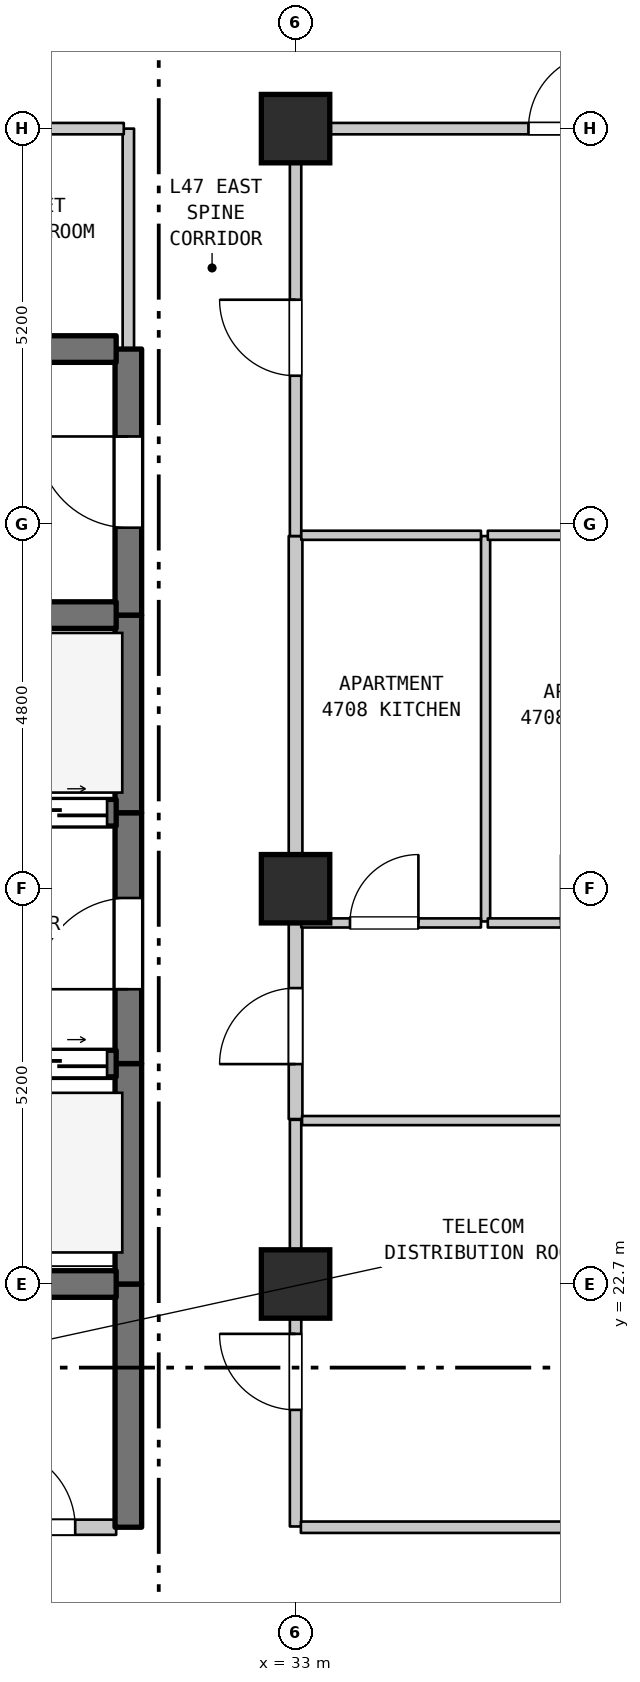
"""IFC4 building model, lengths in metres.
Left out: names, types, materials, properties, quantities, classifications, styles, units other than length and angle.
Written with IfcOpenShell. Run it as: python <this file> out.ifc"""

import sys

from ifc_helpers import new_model, si_unit, direction, frame, frame_2d, origin, origin_2d, place, context, subcontext, project, spatial, rectangle, extrude, element, fill, save


model = new_model("IFC4")
c1 = context("Model", 3, precision=1e-05, world=origin(), true_north=direction((0.0, 1.0)))
c2 = subcontext(c1, "Body", "Model", "MODEL_VIEW")
j1 = project(units=[si_unit("LENGTHUNIT", "METRE"), si_unit("PLANEANGLEUNIT", "RADIAN")], contexts=[c1])
p1 = place(None, origin())
s1 = spatial("IfcSite", under=j1, at=p1, CompositionType="ELEMENT")
p2 = place(p1, origin())
s2 = spatial("IfcBuilding", under=s1, at=p2, CompositionType="ELEMENT")
p3 = place(p2, frame((0.0, 0.0, 192.1)))
s3 = spatial("IfcBuildingStorey", under=s2, at=p3, CompositionType="ELEMENT", Elevation=192.1)
for number, where, z_axis, x_axis in (
    (1, (33.0, 22.7, 0.0), (0.0, 0.0, 1.0), (1.0, 0.0, 0.0)),
    (2, (33.0, 27.9, 0.0), (0.0, 0.0, 1.0), (1.0, 0.0, 0.0)),
    (3, (33.0, 37.9, 0.0), (0.0, 0.0, 1.0), (1.0, 0.0, 0.0)),
):
    element("IfcColumn", number, at=place(p3, frame(where, z_axis=z_axis, x_axis=x_axis)), inside=s3, PredefinedType="COLUMN", context=c2, shape_type="SweptSolid", body=[
        extrude(rectangle(XDim=0.9, YDim=0.9, at=origin_2d()), origin(), (0.0, 0.0, 1.0), 3.7),
    ])
p4 = place(p3, frame((30.8, 19.5, 0.0), z_axis=(0.0, 0.0, 1.0), x_axis=(0.0, 1.0, 0.0)))
e4 = element("IfcWall", 4, at=p4, inside=s3, PredefinedType="SHEAR", context=c2, shape_type="SweptSolid", body=[
    extrude(rectangle(XDim=3.2, YDim=0.35, at=frame_2d((1.6, 0.0))), origin(), (0.0, 0.0, 1.0), 3.39),
])
p5 = place(p3, frame((30.8, 22.7, 0.0), z_axis=(0.0, 0.0, 1.0), x_axis=(0.0, 1.0, 0.0)))
e5 = element("IfcWall", 5, at=p5, inside=s3, PredefinedType="SHEAR", context=c2, shape_type="SweptSolid", body=[
    extrude(rectangle(XDim=2.9, YDim=0.35, at=frame_2d((1.45, 0.0))), origin(), (0.0, 0.0, 1.0), 3.39),
])
p6 = place(p3, frame((30.8, 25.6, 0.0), z_axis=(0.0, 0.0, 1.0), x_axis=(0.0, 1.0, 0.0)))
e6 = element("IfcWall", 6, at=p6, inside=s3, PredefinedType="SHEAR", context=c2, shape_type="SweptSolid", body=[
    extrude(rectangle(XDim=3.3, YDim=0.35, at=frame_2d((1.65, 0.0))), origin(), (0.0, 0.0, 1.0), 3.39),
])
p7 = place(p6, frame((0.978, 0.0, 0.0)))
e7 = element("IfcOpeningElement", 7, at=p7, cuts=e6, PredefinedType="OPENING", context=c2, shape_type="SweptSolid", body=[
    extrude(rectangle(XDim=1.2, YDim=2.2, at=frame_2d((0.6, 1.1))), frame((0.0, 0.185, 0.0), z_axis=(0.0, -1.0, 0.0), x_axis=(1.0, 0.0, 0.0)), (0.0, 0.0, 1.0), 0.37),
])
p8 = place(p3, frame((30.8, 28.9, 0.0), z_axis=(0.0, 0.0, 1.0), x_axis=(0.0, 1.0, 0.0)))
e8 = element("IfcWall", 8, at=p8, inside=s3, PredefinedType="SHEAR", context=c2, shape_type="SweptSolid", body=[
    extrude(rectangle(XDim=2.6, YDim=0.35, at=frame_2d((1.3, 0.0))), origin(), (0.0, 0.0, 1.0), 3.39),
])
p9 = place(p3, frame((30.8, 31.5, 0.0), z_axis=(0.0, 0.0, 1.0), x_axis=(0.0, 1.0, 0.0)))
e9 = element("IfcWall", 9, at=p9, inside=s3, PredefinedType="SHEAR", context=c2, shape_type="SweptSolid", body=[
    extrude(rectangle(XDim=3.5, YDim=0.35, at=frame_2d((1.75, 0.0))), origin(), (0.0, 0.0, 1.0), 3.39),
])
p10 = place(p9, frame((1.15, 0.0, 0.0)))
e10 = element("IfcOpeningElement", 10, at=p10, cuts=e9, PredefinedType="OPENING", context=c2, shape_type="SweptSolid", body=[
    extrude(rectangle(XDim=1.2, YDim=2.2, at=frame_2d((0.6, 1.1))), frame((0.0, 0.185, 0.0), z_axis=(0.0, -1.0, 0.0), x_axis=(1.0, 0.0, 0.0)), (0.0, 0.0, 1.0), 0.37),
])
p11 = place(p3, frame((30.8, 35.0, 0.0), z_axis=(0.0, 0.0, 1.0), x_axis=(0.0, 1.0, 0.0)))
e11 = element("IfcWall", 11, at=p11, inside=s3, PredefinedType="STANDARD", context=c2, shape_type="SweptSolid", body=[
    extrude(rectangle(XDim=2.9, YDim=0.15, at=frame_2d((1.45, 0.0))), origin(), (0.0, 0.0, 1.0), 3.39),
])
p12 = place(p3, frame((33.0, 19.51, 0.0), z_axis=(0.0, 0.0, 1.0), x_axis=(0.0, 1.0, 0.0)))
e12 = element("IfcWall", 12, at=p12, inside=s3, PredefinedType="STANDARD", context=c2, shape_type="SweptSolid", body=[
    extrude(rectangle(XDim=5.35, YDim=0.15, at=frame_2d((2.675, 0.0))), origin(), (0.0, 0.0, 1.0), 2.99),
])
p13 = place(p12, frame((1.534, 0.0, 0.0)))
e13 = element("IfcOpeningElement", 13, at=p13, cuts=e12, PredefinedType="OPENING", context=c2, shape_type="SweptSolid", body=[
    extrude(rectangle(XDim=1.0, YDim=2.15, at=frame_2d((0.5, 1.075))), frame((0.0, 0.085, 0.0), z_axis=(0.0, -1.0, 0.0), x_axis=(1.0, 0.0, 0.0)), (0.0, 0.0, 1.0), 0.17),
])
p14 = place(p3, frame((33.0, 24.87, 0.0), z_axis=(0.0, 0.0, 1.0), x_axis=(0.0, 1.0, 0.0)))
e14 = element("IfcWall", 14, at=p14, inside=s3, PredefinedType="STANDARD", context=c2, shape_type="SweptSolid", body=[
    extrude(rectangle(XDim=2.6, YDim=0.18, at=frame_2d((1.3, 0.0))), origin(), (0.0, 0.0, 1.0), 2.99),
])
p15 = place(p14, frame((0.723, 0.0, 0.0)))
e15 = element("IfcOpeningElement", 15, at=p15, cuts=e14, PredefinedType="OPENING", context=c2, shape_type="SweptSolid", body=[
    extrude(rectangle(XDim=1.0, YDim=2.15, at=frame_2d((0.5, 1.075))), frame((0.0, 0.1, 0.0), z_axis=(0.0, -1.0, 0.0), x_axis=(1.0, 0.0, 0.0)), (0.0, 0.0, 1.0), 0.2),
])
p16 = place(p3, frame((33.0, 27.47, 0.0), z_axis=(0.0, 0.0, 1.0), x_axis=(0.0, 1.0, 0.0)))
e16 = element("IfcWall", 16, at=p16, inside=s3, PredefinedType="STANDARD", context=c2, shape_type="SweptSolid", body=[
    extrude(rectangle(XDim=5.07, YDim=0.18, at=frame_2d((2.535, 0.0))), origin(), (0.0, 0.0, 1.0), 2.89),
])
p17 = place(p3, frame((33.0, 32.54, 0.0), z_axis=(0.0, 0.0, 1.0), x_axis=(0.0, 1.0, 0.0)))
e17 = element("IfcWall", 17, at=p17, inside=s3, PredefinedType="STANDARD", context=c2, shape_type="SweptSolid", body=[
    extrude(rectangle(XDim=5.36, YDim=0.15, at=frame_2d((2.68, 0.0))), origin(), (0.0, 0.0, 1.0), 2.89),
])
p18 = place(p17, frame((2.109, 0.0, 0.0)))
e18 = element("IfcOpeningElement", 18, at=p18, cuts=e17, PredefinedType="OPENING", context=c2, shape_type="SweptSolid", body=[
    extrude(rectangle(XDim=1.0, YDim=2.15, at=frame_2d((0.5, 1.075))), frame((0.0, 0.085, 0.0), z_axis=(0.0, -1.0, 0.0), x_axis=(1.0, 0.0, 0.0)), (0.0, 0.0, 1.0), 0.17),
])
p19 = place(p3, frame((35.5, 27.47, 0.0), z_axis=(0.0, 0.0, 1.0), x_axis=(0.0, 1.0, 0.0)))
e19 = element("IfcWall", 19, at=p19, inside=s3, PredefinedType="PARTITIONING", context=c2, shape_type="SweptSolid", body=[
    extrude(rectangle(XDim=5.07, YDim=0.12, at=frame_2d((2.535, 0.0))), origin(), (0.0, 0.0, 1.0), 3.39),
])
p20 = place(p3, frame((28.585, 19.5, 0.0), z_axis=(0.0, 0.0, 1.0), x_axis=(1.0, 0.0, 0.0)))
e20 = element("IfcWall", 20, at=p20, inside=s3, PredefinedType="STANDARD", context=c2, shape_type="SweptSolid", body=[
    extrude(rectangle(XDim=2.055, YDim=0.2, at=frame_2d((1.027, 0.0))), origin(), (0.0, 0.0, 1.0), 3.39),
])
p21 = place(p20, frame((0.466, 0.0, 0.0)))
e21 = element("IfcOpeningElement", 21, at=p21, cuts=e20, PredefinedType="OPENING", context=c2, shape_type="SweptSolid", body=[
    extrude(rectangle(XDim=1.05, YDim=2.15, at=frame_2d((0.525, 1.075))), frame((0.0, 0.11, 0.0), z_axis=(0.0, -1.0, 0.0), x_axis=(1.0, 0.0, 0.0)), (0.0, 0.0, 1.0), 0.22),
])
p22 = place(p3, frame((33.07, 19.5, 0.0), z_axis=(0.0, 0.0, 1.0), x_axis=(1.0, 0.0, 0.0)))
e22 = element("IfcWall", 22, at=p22, inside=s3, PredefinedType="STANDARD", context=c2, shape_type="SweptSolid", body=[
    extrude(rectangle(XDim=21.51, YDim=0.15, at=frame_2d((10.755, 0.0))), origin(), (0.0, 0.0, 1.0), 3.39),
])
p23 = place(p22, frame((10.185, 0.0, 0.0)))
e23 = element("IfcOpeningElement", 23, at=p23, cuts=e22, PredefinedType="OPENING", context=c2, shape_type="SweptSolid", body=[
    extrude(rectangle(XDim=1.0, YDim=2.15, at=frame_2d((0.5, 1.075))), frame((0.0, 0.085, 0.0), z_axis=(0.0, -1.0, 0.0), x_axis=(1.0, 0.0, 0.0)), (0.0, 0.0, 1.0), 0.17),
])
p24 = place(p3, frame((28.585, 22.7, 0.0), z_axis=(0.0, 0.0, 1.0), x_axis=(1.0, 0.0, 0.0)))
e24 = element("IfcWall", 24, at=p24, inside=s3, PredefinedType="SHEAR", context=c2, shape_type="SweptSolid", body=[
    extrude(rectangle(XDim=2.055, YDim=0.35, at=frame_2d((1.027, 0.0))), origin(), (0.0, 0.0, 1.0), 3.39),
])
p25 = place(p3, frame((33.085, 24.85, 0.0), z_axis=(0.0, 0.0, 1.0), x_axis=(1.0, 0.0, 0.0)))
e25 = element("IfcWall", 25, at=p25, inside=s3, PredefinedType="PARTITIONING", context=c2, shape_type="SweptSolid", body=[
    extrude(rectangle(XDim=23.905, YDim=0.12, at=frame_2d((11.953, 0.0))), origin(), (0.0, 0.0, 1.0), 3.39),
])
p26 = place(p3, frame((27.46, 25.6, 0.0), z_axis=(0.0, 0.0, 1.0), x_axis=(1.0, 0.0, 0.0)))
e26 = element("IfcWall", 26, at=p26, inside=s3, PredefinedType="SHEAR", context=c2, shape_type="SweptSolid", body=[
    extrude(rectangle(XDim=3.18, YDim=0.35, at=frame_2d((1.59, 0.0))), origin(), (0.0, 0.0, 1.0), 3.39),
])
p27 = place(p26, frame((0.12, 0.0, 0.0)))
e27 = element("IfcOpeningElement", 27, at=p27, cuts=e26, PredefinedType="OPENING", context=c2, shape_type="SweptSolid", body=[
    extrude(rectangle(XDim=1.25, YDim=2.2, at=frame_2d((0.625, 1.1))), frame((0.0, 0.185, 0.0), z_axis=(0.0, -1.0, 0.0), x_axis=(1.0, 0.0, 0.0)), (0.0, 0.0, 1.0), 0.37),
])
p28 = place(p26, frame((1.81, 0.0, 0.0)))
e28 = element("IfcOpeningElement", 28, at=p28, cuts=e26, PredefinedType="OPENING", context=c2, shape_type="SweptSolid", body=[
    extrude(rectangle(XDim=1.25, YDim=2.2, at=frame_2d((0.625, 1.1))), frame((0.0, 0.185, 0.0), z_axis=(0.0, -1.0, 0.0), x_axis=(1.0, 0.0, 0.0)), (0.0, 0.0, 1.0), 0.37),
])
p29 = place(p3, frame((33.075, 27.45, 0.0), z_axis=(0.0, 0.0, 1.0), x_axis=(1.0, 0.0, 0.0)))
e29 = element("IfcWall", 29, at=p29, inside=s3, PredefinedType="PARTITIONING", context=c2, shape_type="SweptSolid", body=[
    extrude(rectangle(XDim=2.364, YDim=0.12, at=frame_2d((1.182, 0.0))), origin(), (0.0, 0.0, 1.0), 3.39),
])
p30 = place(p29, frame((0.641, 0.0, 0.0)))
e30 = element("IfcOpeningElement", 30, at=p30, cuts=e29, PredefinedType="OPENING", context=c2, shape_type="SweptSolid", body=[
    extrude(rectangle(XDim=0.9, YDim=2.15, at=frame_2d((0.45, 1.075))), frame((0.0, 0.07, 0.0), z_axis=(0.0, -1.0, 0.0), x_axis=(1.0, 0.0, 0.0)), (0.0, 0.0, 1.0), 0.14),
])
p31 = place(p3, frame((35.529, 27.45, 0.0), z_axis=(0.0, 0.0, 1.0), x_axis=(1.0, 0.0, 0.0)))
e31 = element("IfcWall", 31, at=p31, inside=s3, PredefinedType="PARTITIONING", context=c2, shape_type="SweptSolid", body=[
    extrude(rectangle(XDim=2.826, YDim=0.12, at=frame_2d((1.413, 0.0))), origin(), (0.0, 0.0, 1.0), 3.39),
])
p32 = place(p31, frame((0.963, 0.0, 0.0)))
e32 = element("IfcOpeningElement", 32, at=p32, cuts=e31, PredefinedType="OPENING", context=c2, shape_type="SweptSolid", body=[
    extrude(rectangle(XDim=0.9, YDim=2.1, at=frame_2d((0.45, 1.05))), frame((0.0, 0.07, 0.0), z_axis=(0.0, -1.0, 0.0), x_axis=(1.0, 0.0, 0.0)), (0.0, 0.0, 1.0), 0.14),
])
p33 = place(p3, frame((27.46, 28.9, 0.0), z_axis=(0.0, 0.0, 1.0), x_axis=(1.0, 0.0, 0.0)))
e33 = element("IfcWall", 33, at=p33, inside=s3, PredefinedType="SHEAR", context=c2, shape_type="SweptSolid", body=[
    extrude(rectangle(XDim=3.18, YDim=0.35, at=frame_2d((1.59, 0.0))), origin(), (0.0, 0.0, 1.0), 3.39),
])
p34 = place(p33, frame((0.12, 0.0, 0.0)))
e34 = element("IfcOpeningElement", 34, at=p34, cuts=e33, PredefinedType="OPENING", context=c2, shape_type="SweptSolid", body=[
    extrude(rectangle(XDim=1.25, YDim=2.2, at=frame_2d((0.625, 1.1))), frame((0.0, 0.185, 0.0), z_axis=(0.0, -1.0, 0.0), x_axis=(1.0, 0.0, 0.0)), (0.0, 0.0, 1.0), 0.37),
])
p35 = place(p33, frame((1.81, 0.0, 0.0)))
e35 = element("IfcOpeningElement", 35, at=p35, cuts=e33, PredefinedType="OPENING", context=c2, shape_type="SweptSolid", body=[
    extrude(rectangle(XDim=1.25, YDim=2.2, at=frame_2d((0.625, 1.1))), frame((0.0, 0.185, 0.0), z_axis=(0.0, -1.0, 0.0), x_axis=(1.0, 0.0, 0.0)), (0.0, 0.0, 1.0), 0.37),
])
p36 = place(p3, frame((27.46, 31.5, 0.0), z_axis=(0.0, 0.0, 1.0), x_axis=(1.0, 0.0, 0.0)))
e36 = element("IfcWall", 36, at=p36, inside=s3, PredefinedType="SHEAR", context=c2, shape_type="SweptSolid", body=[
    extrude(rectangle(XDim=3.18, YDim=0.35, at=frame_2d((1.59, 0.0))), origin(), (0.0, 0.0, 1.0), 3.39),
])
p37 = place(p3, frame((33.075, 32.55, 0.0), z_axis=(0.0, 0.0, 1.0), x_axis=(1.0, 0.0, 0.0)))
e37 = element("IfcWall", 37, at=p37, inside=s3, PredefinedType="PARTITIONING", context=c2, shape_type="SweptSolid", body=[
    extrude(rectangle(XDim=2.364, YDim=0.12, at=frame_2d((1.182, 0.0))), origin(), (0.0, 0.0, 1.0), 3.39),
])
p38 = place(p3, frame((35.529, 32.55, 0.0), z_axis=(0.0, 0.0, 1.0), x_axis=(1.0, 0.0, 0.0)))
e38 = element("IfcWall", 38, at=p38, inside=s3, PredefinedType="PARTITIONING", context=c2, shape_type="SweptSolid", body=[
    extrude(rectangle(XDim=2.826, YDim=0.12, at=frame_2d((1.413, 0.0))), origin(), (0.0, 0.0, 1.0), 3.39),
])
p39 = place(p3, frame((26.645, 35.0, 0.0), z_axis=(0.0, 0.0, 1.0), x_axis=(1.0, 0.0, 0.0)))
e39 = element("IfcWall", 39, at=p39, inside=s3, PredefinedType="SHEAR", context=c2, shape_type="SweptSolid", body=[
    extrude(rectangle(XDim=3.995, YDim=0.35, at=frame_2d((1.998, 0.0))), origin(), (0.0, 0.0, 1.0), 3.39),
])
p40 = place(p39, frame((1.508, 0.0, 0.0)))
e40 = element("IfcOpeningElement", 40, at=p40, cuts=e39, PredefinedType="OPENING", context=c2, shape_type="SweptSolid", body=[
    extrude(rectangle(XDim=0.95, YDim=2.15, at=frame_2d((0.475, 1.075))), frame((0.0, 0.185, 0.0), z_axis=(0.0, -1.0, 0.0), x_axis=(1.0, 0.0, 0.0)), (0.0, 0.0, 1.0), 0.37),
])
p41 = place(p3, frame((26.645, 37.9, 0.0), z_axis=(0.0, 0.0, 1.0), x_axis=(1.0, 0.0, 0.0)))
e41 = element("IfcWall", 41, at=p41, inside=s3, PredefinedType="STANDARD", context=c2, shape_type="SweptSolid", body=[
    extrude(rectangle(XDim=4.095, YDim=0.15, at=frame_2d((2.047, 0.0))), origin(), (0.0, 0.0, 1.0), 2.89),
])
p42 = place(p3, frame((33.06, 37.9, 0.0), z_axis=(0.0, 0.0, 1.0), x_axis=(1.0, 0.0, 0.0)))
e42 = element("IfcWall", 42, at=p42, inside=s3, PredefinedType="STANDARD", context=c2, shape_type="SweptSolid", body=[
    extrude(rectangle(XDim=7.164, YDim=0.15, at=frame_2d((3.582, 0.0))), origin(), (0.0, 0.0, 1.0), 3.39),
])
p43 = place(p42, frame((3.004, 0.0, 0.0)))
e43 = element("IfcOpeningElement", 43, at=p43, cuts=e42, PredefinedType="OPENING", context=c2, shape_type="SweptSolid", body=[
    extrude(rectangle(XDim=1.0, YDim=2.15, at=frame_2d((0.5, 1.075))), frame((0.0, 0.085, 0.0), z_axis=(0.0, -1.0, 0.0), x_axis=(1.0, 0.0, 0.0)), (0.0, 0.0, 1.0), 0.17),
])
p44 = place(p7, origin())
e44 = element("IfcDoor", 44, at=p44, inside=s3, OperationType="SINGLE_SWING_LEFT", PredefinedType="DOOR", context=c2, shape_type="SweptSolid", body=[
    extrude(rectangle(XDim=1.2, YDim=2.2, at=frame_2d((0.6, 1.1))), frame((0.0, 0.025, 0.0), z_axis=(0.0, -1.0, 0.0), x_axis=(1.0, 0.0, 0.0)), (0.0, 0.0, 1.0), 0.05),
])
fill(e7, e44)
p45 = place(p10, origin())
e45 = element("IfcDoor", 45, at=p45, inside=s3, OperationType="SINGLE_SWING_RIGHT", PredefinedType="DOOR", context=c2, shape_type="SweptSolid", body=[
    extrude(rectangle(XDim=1.2, YDim=2.2, at=frame_2d((0.6, 1.1))), frame((0.0, 0.025, 0.0), z_axis=(0.0, -1.0, 0.0), x_axis=(1.0, 0.0, 0.0)), (0.0, 0.0, 1.0), 0.05),
])
fill(e10, e45)
p46 = place(p13, origin())
e46 = element("IfcDoor", 46, at=p46, inside=s3, OperationType="SINGLE_SWING_RIGHT", PredefinedType="DOOR", context=c2, shape_type="SweptSolid", body=[
    extrude(rectangle(XDim=1.0, YDim=2.15, at=frame_2d((0.5, 1.075))), frame((0.0, 0.025, 0.0), z_axis=(0.0, -1.0, 0.0), x_axis=(1.0, 0.0, 0.0)), (0.0, 0.0, 1.0), 0.05),
])
fill(e13, e46)
p47 = place(p15, origin())
e47 = element("IfcDoor", 47, at=p47, inside=s3, OperationType="SINGLE_SWING_LEFT", PredefinedType="DOOR", context=c2, shape_type="SweptSolid", body=[
    extrude(rectangle(XDim=1.0, YDim=2.15, at=frame_2d((0.5, 1.075))), frame((0.0, 0.025, 0.0), z_axis=(0.0, -1.0, 0.0), x_axis=(1.0, 0.0, 0.0)), (0.0, 0.0, 1.0), 0.05),
])
fill(e15, e47)
p48 = place(p18, origin())
e48 = element("IfcDoor", 48, at=p48, inside=s3, OperationType="SINGLE_SWING_RIGHT", PredefinedType="DOOR", context=c2, shape_type="SweptSolid", body=[
    extrude(rectangle(XDim=1.0, YDim=2.15, at=frame_2d((0.5, 1.075))), frame((0.0, 0.025, 0.0), z_axis=(0.0, -1.0, 0.0), x_axis=(1.0, 0.0, 0.0)), (0.0, 0.0, 1.0), 0.05),
])
fill(e18, e48)
p49 = place(p21, origin())
e49 = element("IfcDoor", 49, at=p49, inside=s3, OperationType="SINGLE_SWING_LEFT", PredefinedType="DOOR", context=c2, shape_type="SweptSolid", body=[
    extrude(rectangle(XDim=1.05, YDim=2.15, at=frame_2d((0.525, 1.075))), frame((0.0, 0.025, 0.0), z_axis=(0.0, -1.0, 0.0), x_axis=(1.0, 0.0, 0.0)), (0.0, 0.0, 1.0), 0.05),
])
fill(e21, e49)
p50 = place(p28, origin())
e50 = element("IfcDoor", 50, at=p50, inside=s3, OperationType="DOUBLE_DOOR_SLIDING", PredefinedType="DOOR", context=c2, shape_type="SweptSolid", body=[
    extrude(rectangle(XDim=1.25, YDim=2.2, at=frame_2d((0.625, 1.1))), frame((0.0, 0.025, 0.0), z_axis=(0.0, -1.0, 0.0), x_axis=(1.0, 0.0, 0.0)), (0.0, 0.0, 1.0), 0.05),
])
fill(e28, e50)
p51 = place(p30, origin())
e51 = element("IfcDoor", 51, at=p51, inside=s3, OperationType="SINGLE_SWING_RIGHT", PredefinedType="DOOR", context=c2, shape_type="SweptSolid", body=[
    extrude(rectangle(XDim=0.9, YDim=2.15, at=frame_2d((0.45, 1.075))), frame((0.0, 0.025, 0.0), z_axis=(0.0, -1.0, 0.0), x_axis=(1.0, 0.0, 0.0)), (0.0, 0.0, 1.0), 0.05),
])
fill(e30, e51)
p52 = place(p35, origin())
e52 = element("IfcDoor", 52, at=p52, inside=s3, OperationType="DOUBLE_DOOR_SLIDING", PredefinedType="DOOR", context=c2, shape_type="SweptSolid", body=[
    extrude(rectangle(XDim=1.25, YDim=2.2, at=frame_2d((0.625, 1.1))), frame((0.0, 0.025, 0.0), z_axis=(0.0, -1.0, 0.0), x_axis=(1.0, 0.0, 0.0)), (0.0, 0.0, 1.0), 0.05),
])
fill(e35, e52)
p53 = place(p43, origin())
e53 = element("IfcDoor", 53, at=p53, inside=s3, OperationType="SINGLE_SWING_RIGHT", PredefinedType="DOOR", context=c2, shape_type="SweptSolid", body=[
    extrude(rectangle(XDim=1.0, YDim=2.15, at=frame_2d((0.5, 1.075))), frame((0.0, 0.025, 0.0), z_axis=(0.0, -1.0, 0.0), x_axis=(1.0, 0.0, 0.0)), (0.0, 0.0, 1.0), 0.05),
])
fill(e43, e53)
save(model, sys.argv[1])
